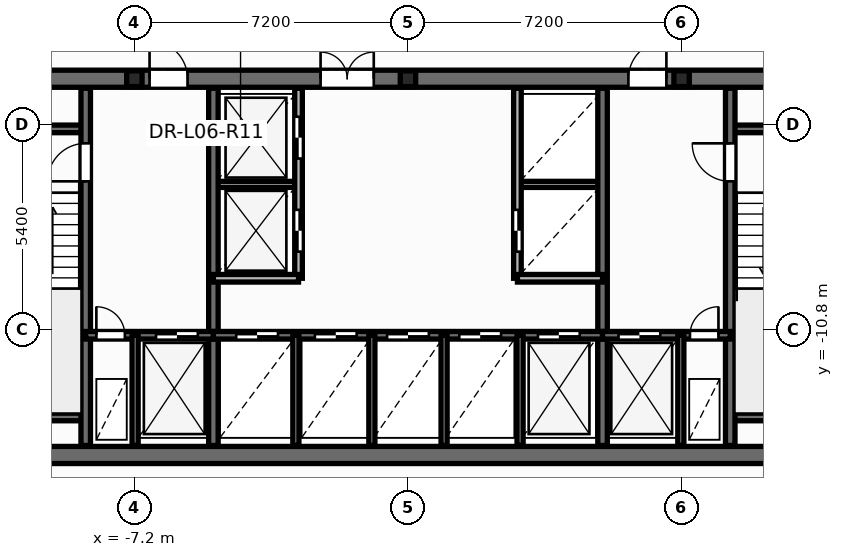
"""IFC4 building model, lengths in metres.
Left out: names, types, materials, properties, quantities, classifications, styles, units other than length and angle.
Written with IfcOpenShell. Run it as: python <this file> out.ifc"""

import sys

from ifc_helpers import new_model, si_unit, direction, frame, frame_2d, origin, origin_2d, place, context, subcontext, project, spatial, rectangle, i_section, extrude, element, fill, save


model = new_model("IFC4")
c1 = context("Model", 3, precision=1e-05, world=origin(), true_north=direction((0.0, 1.0)))
c2 = subcontext(c1, "Body", "Model", "MODEL_VIEW")
j1 = project(units=[si_unit("LENGTHUNIT", "METRE"), si_unit("PLANEANGLEUNIT", "RADIAN")], contexts=[c1])
p1 = place(None, origin())
s1 = spatial("IfcSite", under=j1, at=p1, CompositionType="ELEMENT")
p2 = place(p1, origin())
s2 = spatial("IfcBuilding", under=s1, at=p2, CompositionType="ELEMENT")
p3 = place(p2, frame((0.0, 0.0, 27.9)))
s3 = spatial("IfcBuildingStorey", under=s2, at=p3, CompositionType="ELEMENT", Elevation=27.9)
for number, where, z_axis, x_axis in (
    (1, (-7.2, -4.2, 0.0), (0.0, 0.0, 1.0), (1.0, 0.0, 0.0)),
    (2, (0.0, -4.2, 0.0), (0.0, 0.0, 1.0), (1.0, 0.0, 0.0)),
    (3, (7.2, -4.2, 0.0), (0.0, 0.0, 1.0), (1.0, 0.0, 0.0)),
):
    element("IfcColumn", number, at=place(p3, frame(where, z_axis=z_axis, x_axis=x_axis)), inside=s3, PredefinedType="PILASTER", context=c2, shape_type="SweptSolid", body=[
        extrude(i_section(OverallWidth=0.405, OverallDepth=0.414, WebThickness=0.022, FlangeThickness=0.032, at=origin_2d()), origin(), (0.0, 0.0, 1.0), 3.6),
    ])
for number, where, z_axis, x_axis in (
    (4, (-5.12, -6.98, 0.0), (0.0, 0.0, 1.0), (1.0, 0.0, 0.0)),
    (5, (2.88, -6.98, 0.0), (0.0, 0.0, 1.0), (1.0, 0.0, 0.0)),
):
    element("IfcWall", number, at=place(p3, frame(where, z_axis=z_axis, x_axis=x_axis)), inside=s3, PredefinedType="PARTITIONING", context=c2, shape_type="SweptSolid", body=[
        extrude(rectangle(XDim=2.24, YDim=0.16, at=frame_2d((1.12, 0.0))), origin(), (0.0, 0.0, 1.0), 3.35),
    ])
p4 = place(p3, frame((-12.65, -14.1, 0.0), z_axis=(0.0, 0.0, 1.0), x_axis=(1.0, 0.0, 0.0)))
e6 = element("IfcWall", 6, at=p4, inside=s3, PredefinedType="SHEAR", context=c2, shape_type="SweptSolid", body=[
    extrude(rectangle(XDim=25.3, YDim=0.45, at=frame_2d((12.65, 0.0))), origin(), (0.0, 0.0, 1.0), 3.6),
])
p5 = place(p3, frame((-12.65, -4.2, 0.0), z_axis=(0.0, 0.0, 1.0), x_axis=(1.0, 0.0, 0.0)))
e7 = element("IfcWall", 7, at=p5, inside=s3, PredefinedType="SHEAR", context=c2, shape_type="SweptSolid", body=[
    extrude(rectangle(XDim=25.3, YDim=0.45, at=frame_2d((12.65, 0.0))), origin(), (0.0, 0.0, 1.0), 3.6),
])
p6 = place(p5, frame((1.85, 0.0, 0.0)))
e8 = element("IfcOpeningElement", 8, at=p6, cuts=e7, PredefinedType="OPENING", context=c2, shape_type="SweptSolid", body=[
    extrude(rectangle(XDim=0.756, YDim=2.054, at=frame_2d((0.375, 1.027))), frame((0.0, 0.235, 0.0), z_axis=(0.0, -1.0, 0.0), x_axis=(1.0, 0.0, 0.0)), (0.0, 0.0, 1.0), 0.47),
])
p7 = place(p5, frame((22.65, 0.0, 0.0)))
e9 = element("IfcOpeningElement", 9, at=p7, cuts=e7, PredefinedType="OPENING", context=c2, shape_type="SweptSolid", body=[
    extrude(rectangle(XDim=0.756, YDim=2.054, at=frame_2d((0.375, 1.027))), frame((0.0, 0.235, 0.0), z_axis=(0.0, -1.0, 0.0), x_axis=(1.0, 0.0, 0.0)), (0.0, 0.0, 1.0), 0.47),
])
p8 = place(p5, frame((5.85, 0.0, 0.0)))
e10 = element("IfcOpeningElement", 10, at=p8, cuts=e7, PredefinedType="OPENING", context=c2, shape_type="SweptSolid", body=[
    extrude(rectangle(XDim=1.006, YDim=2.104, at=frame_2d((0.5, 1.052))), frame((0.0, 0.235, 0.0), z_axis=(0.0, -1.0, 0.0), x_axis=(1.0, 0.0, 0.0)), (0.0, 0.0, 1.0), 0.47),
])
p9 = place(p5, frame((10.35, 0.0, 0.0)))
e11 = element("IfcOpeningElement", 11, at=p9, cuts=e7, PredefinedType="OPENING", context=c2, shape_type="SweptSolid", body=[
    extrude(rectangle(XDim=1.406, YDim=2.154, at=frame_2d((0.7, 1.077))), frame((0.0, 0.235, 0.0), z_axis=(0.0, -1.0, 0.0), x_axis=(1.0, 0.0, 0.0)), (0.0, 0.0, 1.0), 0.47),
])
p10 = place(p5, frame((18.45, 0.0, 0.0)))
e12 = element("IfcOpeningElement", 12, at=p10, cuts=e7, PredefinedType="OPENING", context=c2, shape_type="SweptSolid", body=[
    extrude(rectangle(XDim=1.006, YDim=2.104, at=frame_2d((0.5, 1.052))), frame((0.0, 0.235, 0.0), z_axis=(0.0, -1.0, 0.0), x_axis=(1.0, 0.0, 0.0)), (0.0, 0.0, 1.0), 0.47),
])
for number, where, z_axis, x_axis in (
    (13, (-12.35, -5.52, 0.0), (0.0, 0.0, 1.0), (1.0, 0.0, 0.0)),
    (14, (-12.35, -13.1, 0.0), (0.0, 0.0, 1.0), (1.0, 0.0, 0.0)),
    (15, (8.48, -5.52, 0.0), (0.0, 0.0, 1.0), (1.0, 0.0, 0.0)),
    (16, (8.48, -13.1, 0.0), (0.0, 0.0, 1.0), (1.0, 0.0, 0.0)),
):
    element("IfcWall", number, at=place(p3, frame(where, z_axis=z_axis, x_axis=x_axis)), inside=s3, PredefinedType="SOLIDWALL", context=c2, shape_type="SweptSolid", body=[
        extrude(rectangle(XDim=3.87, YDim=0.2, at=frame_2d((1.935, 0.0))), origin(), (0.0, 0.0, 1.0), 3.6),
    ])
p11 = place(p3, frame((-8.48, -13.85, 0.0), z_axis=(0.0, 0.0, 1.0), x_axis=(0.0, 1.0, 0.0)))
e17 = element("IfcWall", 17, at=p11, inside=s3, PredefinedType="SHEAR", context=c2, shape_type="SweptSolid", body=[
    extrude(rectangle(XDim=9.4, YDim=0.25, at=frame_2d((4.7, 0.0))), origin(), (0.0, 0.0, 1.0), 3.6),
])
p12 = place(p11, frame((6.95, 0.0, 0.0)))
e18 = element("IfcOpeningElement", 18, at=p12, cuts=e17, PredefinedType="OPENING", context=c2, shape_type="SweptSolid", body=[
    extrude(rectangle(XDim=1.006, YDim=2.104, at=frame_2d((0.5, 1.052))), frame((0.0, 0.135, 0.0), z_axis=(0.0, -1.0, 0.0), x_axis=(1.0, 0.0, 0.0)), (0.0, 0.0, 1.0), 0.27),
])
p13 = place(p3, frame((8.48, -13.85, 0.0), z_axis=(0.0, 0.0, 1.0), x_axis=(0.0, 1.0, 0.0)))
e19 = element("IfcWall", 19, at=p13, inside=s3, PredefinedType="SHEAR", context=c2, shape_type="SweptSolid", body=[
    extrude(rectangle(XDim=9.4, YDim=0.25, at=frame_2d((4.7, 0.0))), origin(), (0.0, 0.0, 1.0), 3.6),
])
p14 = place(p13, frame((6.95, 0.0, 0.0)))
e20 = element("IfcOpeningElement", 20, at=p14, cuts=e19, PredefinedType="OPENING", context=c2, shape_type="SweptSolid", body=[
    extrude(rectangle(XDim=1.006, YDim=2.104, at=frame_2d((0.5, 1.052))), frame((0.0, 0.135, 0.0), z_axis=(0.0, -1.0, 0.0), x_axis=(1.0, 0.0, 0.0)), (0.0, 0.0, 1.0), 0.27),
])
for number, where, z_axis, x_axis in (
    (21, (-5.12, -13.85, 0.0), (0.0, 0.0, 1.0), (0.0, 1.0, 0.0)),
    (22, (5.12, -13.85, 0.0), (0.0, 0.0, 1.0), (0.0, 1.0, 0.0)),
):
    element("IfcWall", number, at=place(p3, frame(where, z_axis=z_axis, x_axis=x_axis)), inside=s3, PredefinedType="SHEAR", context=c2, shape_type="SweptSolid", body=[
        extrude(rectangle(XDim=9.4, YDim=0.25, at=frame_2d((4.7, 0.0))), origin(), (0.0, 0.0, 1.0), 3.6),
    ])
p15 = place(p3, frame((-8.48, -10.95, 0.0), z_axis=(0.0, 0.0, 1.0), x_axis=(1.0, 0.0, 0.0)))
e23 = element("IfcWall", 23, at=p15, inside=s3, PredefinedType="SOLIDWALL", context=c2, shape_type="SweptSolid", body=[
    extrude(rectangle(XDim=3.36, YDim=0.2, at=frame_2d((1.68, 0.0))), origin(), (0.0, 0.0, 1.0), 3.6),
])
p16 = place(p15, frame((0.28, 0.0, 0.0)))
e24 = element("IfcOpeningElement", 24, at=p16, cuts=e23, PredefinedType="OPENING", context=c2, shape_type="SweptSolid", body=[
    extrude(rectangle(XDim=0.756, YDim=2.054, at=frame_2d((0.375, 1.027))), frame((0.0, 0.11, 0.0), z_axis=(0.0, -1.0, 0.0), x_axis=(1.0, 0.0, 0.0)), (0.0, 0.0, 1.0), 0.22),
])
p17 = place(p15, frame((1.85, 0.0, 0.0)))
e25 = element("IfcOpeningElement", 25, at=p17, cuts=e23, PredefinedType="OPENING", context=c2, shape_type="SweptSolid", body=[
    extrude(rectangle(XDim=1.106, YDim=2.104, at=frame_2d((0.55, 1.052))), frame((0.0, 0.11, 0.0), z_axis=(0.0, -1.0, 0.0), x_axis=(1.0, 0.0, 0.0)), (0.0, 0.0, 1.0), 0.22),
])
p18 = place(p3, frame((-5.12, -10.95, 0.0), z_axis=(0.0, 0.0, 1.0), x_axis=(1.0, 0.0, 0.0)))
e26 = element("IfcWall", 26, at=p18, inside=s3, PredefinedType="SOLIDWALL", context=c2, shape_type="SweptSolid", body=[
    extrude(rectangle(XDim=10.24, YDim=0.2, at=frame_2d((5.12, 0.0))), origin(), (0.0, 0.0, 1.0), 3.6),
])
p19 = place(p18, frame((0.6, 0.0, 0.0)))
e27 = element("IfcOpeningElement", 27, at=p19, cuts=e26, PredefinedType="OPENING", context=c2, shape_type="SweptSolid", body=[
    extrude(rectangle(XDim=1.106, YDim=2.104, at=frame_2d((0.55, 1.052))), frame((0.0, 0.11, 0.0), z_axis=(0.0, -1.0, 0.0), x_axis=(1.0, 0.0, 0.0)), (0.0, 0.0, 1.0), 0.22),
])
p20 = place(p18, frame((2.67, 0.0, 0.0)))
e28 = element("IfcOpeningElement", 28, at=p20, cuts=e26, PredefinedType="OPENING", context=c2, shape_type="SweptSolid", body=[
    extrude(rectangle(XDim=1.106, YDim=2.104, at=frame_2d((0.55, 1.052))), frame((0.0, 0.11, 0.0), z_axis=(0.0, -1.0, 0.0), x_axis=(1.0, 0.0, 0.0)), (0.0, 0.0, 1.0), 0.22),
])
p21 = place(p18, frame((4.57, 0.0, 0.0)))
e29 = element("IfcOpeningElement", 29, at=p21, cuts=e26, PredefinedType="OPENING", context=c2, shape_type="SweptSolid", body=[
    extrude(rectangle(XDim=1.106, YDim=2.104, at=frame_2d((0.55, 1.052))), frame((0.0, 0.11, 0.0), z_axis=(0.0, -1.0, 0.0), x_axis=(1.0, 0.0, 0.0)), (0.0, 0.0, 1.0), 0.22),
])
p22 = place(p18, frame((6.47, 0.0, 0.0)))
e30 = element("IfcOpeningElement", 30, at=p22, cuts=e26, PredefinedType="OPENING", context=c2, shape_type="SweptSolid", body=[
    extrude(rectangle(XDim=1.106, YDim=2.104, at=frame_2d((0.55, 1.052))), frame((0.0, 0.11, 0.0), z_axis=(0.0, -1.0, 0.0), x_axis=(1.0, 0.0, 0.0)), (0.0, 0.0, 1.0), 0.22),
])
p23 = place(p18, frame((8.54, 0.0, 0.0)))
e31 = element("IfcOpeningElement", 31, at=p23, cuts=e26, PredefinedType="OPENING", context=c2, shape_type="SweptSolid", body=[
    extrude(rectangle(XDim=1.106, YDim=2.104, at=frame_2d((0.55, 1.052))), frame((0.0, 0.11, 0.0), z_axis=(0.0, -1.0, 0.0), x_axis=(1.0, 0.0, 0.0)), (0.0, 0.0, 1.0), 0.22),
])
p24 = place(p3, frame((5.12, -10.95, 0.0), z_axis=(0.0, 0.0, 1.0), x_axis=(1.0, 0.0, 0.0)))
e32 = element("IfcWall", 32, at=p24, inside=s3, PredefinedType="SOLIDWALL", context=c2, shape_type="SweptSolid", body=[
    extrude(rectangle(XDim=3.36, YDim=0.2, at=frame_2d((1.68, 0.0))), origin(), (0.0, 0.0, 1.0), 3.6),
])
p25 = place(p24, frame((0.42, 0.0, 0.0)))
e33 = element("IfcOpeningElement", 33, at=p25, cuts=e32, PredefinedType="OPENING", context=c2, shape_type="SweptSolid", body=[
    extrude(rectangle(XDim=1.106, YDim=2.104, at=frame_2d((0.55, 1.052))), frame((0.0, 0.11, 0.0), z_axis=(0.0, -1.0, 0.0), x_axis=(1.0, 0.0, 0.0)), (0.0, 0.0, 1.0), 0.22),
])
p26 = place(p24, frame((2.3, 0.0, 0.0)))
e34 = element("IfcOpeningElement", 34, at=p26, cuts=e32, PredefinedType="OPENING", context=c2, shape_type="SweptSolid", body=[
    extrude(rectangle(XDim=0.756, YDim=2.054, at=frame_2d((0.375, 1.027))), frame((0.0, 0.11, 0.0), z_axis=(0.0, -1.0, 0.0), x_axis=(1.0, 0.0, 0.0)), (0.0, 0.0, 1.0), 0.22),
])
for number, where, z_axis, x_axis in (
    (35, (-7.18, -13.85, 0.0), (0.0, 0.0, 1.0), (0.0, 1.0, 0.0)),
    (36, (7.18, -13.85, 0.0), (0.0, 0.0, 1.0), (0.0, 1.0, 0.0)),
    (37, (-2.95, -13.85, 0.0), (0.0, 0.0, 1.0), (0.0, 1.0, 0.0)),
    (38, (2.95, -13.85, 0.0), (0.0, 0.0, 1.0), (0.0, 1.0, 0.0)),
):
    element("IfcWall", number, at=place(p3, frame(where, z_axis=z_axis, x_axis=x_axis)), inside=s3, PredefinedType="PARTITIONING", context=c2, shape_type="SweptSolid", body=[
        extrude(rectangle(XDim=2.9, YDim=0.16, at=frame_2d((1.45, 0.0))), origin(), (0.0, 0.0, 1.0), 2.375),
    ])
p27 = place(p3, frame((-2.88, -9.45, 0.0), z_axis=(0.0, 0.0, 1.0), x_axis=(0.0, 1.0, 0.0)))
e39 = element("IfcWall", 39, at=p27, inside=s3, PredefinedType="SOLIDWALL", context=c2, shape_type="SweptSolid", body=[
    extrude(rectangle(XDim=5.0, YDim=0.2, at=frame_2d((2.5, 0.0))), origin(), (0.0, 0.0, 1.0), 3.35),
])
p28 = place(p27, frame((0.7, 0.0, 0.0)))
e40 = element("IfcOpeningElement", 40, at=p28, cuts=e39, PredefinedType="OPENING", context=c2, shape_type="SweptSolid", body=[
    extrude(rectangle(XDim=1.106, YDim=2.104, at=frame_2d((0.55, 1.052))), frame((0.0, 0.11, 0.0), z_axis=(0.0, -1.0, 0.0), x_axis=(1.0, 0.0, 0.0)), (0.0, 0.0, 1.0), 0.22),
])
p29 = place(p27, frame((3.15, 0.0, 0.0)))
e41 = element("IfcOpeningElement", 41, at=p29, cuts=e39, PredefinedType="OPENING", context=c2, shape_type="SweptSolid", body=[
    extrude(rectangle(XDim=1.106, YDim=2.104, at=frame_2d((0.55, 1.052))), frame((0.0, 0.11, 0.0), z_axis=(0.0, -1.0, 0.0), x_axis=(1.0, 0.0, 0.0)), (0.0, 0.0, 1.0), 0.22),
])
p30 = place(p3, frame((-5.12, -9.45, 0.0), z_axis=(0.0, 0.0, 1.0), x_axis=(1.0, 0.0, 0.0)))
e42 = element("IfcWall", 42, at=p30, inside=s3, PredefinedType="SOLIDWALL", context=c2, shape_type="SweptSolid", body=[
    extrude(rectangle(XDim=2.24, YDim=0.2, at=frame_2d((1.12, 0.0))), origin(), (0.0, 0.0, 1.0), 3.35),
])
p31 = place(p3, frame((2.88, -9.45, 0.0), z_axis=(0.0, 0.0, 1.0), x_axis=(0.0, 1.0, 0.0)))
e43 = element("IfcWall", 43, at=p31, inside=s3, PredefinedType="SOLIDWALL", context=c2, shape_type="SweptSolid", body=[
    extrude(rectangle(XDim=5.0, YDim=0.2, at=frame_2d((2.5, 0.0))), origin(), (0.0, 0.0, 1.0), 3.35),
])
p32 = place(p31, frame((0.7, 0.0, 0.0)))
e44 = element("IfcOpeningElement", 44, at=p32, cuts=e43, PredefinedType="OPENING", context=c2, shape_type="SweptSolid", body=[
    extrude(rectangle(XDim=1.106, YDim=2.104, at=frame_2d((0.55, 1.052))), frame((0.0, 0.11, 0.0), z_axis=(0.0, -1.0, 0.0), x_axis=(1.0, 0.0, 0.0)), (0.0, 0.0, 1.0), 0.22),
])
p33 = place(p3, frame((2.88, -9.45, 0.0), z_axis=(0.0, 0.0, 1.0), x_axis=(1.0, 0.0, 0.0)))
e45 = element("IfcWall", 45, at=p33, inside=s3, PredefinedType="SOLIDWALL", context=c2, shape_type="SweptSolid", body=[
    extrude(rectangle(XDim=2.24, YDim=0.2, at=frame_2d((1.12, 0.0))), origin(), (0.0, 0.0, 1.0), 3.35),
])
for number, where, z_axis, x_axis in (
    (46, (-0.95, -13.85, 0.0), (0.0, 0.0, 1.0), (0.0, 1.0, 0.0)),
    (47, (0.95, -13.85, 0.0), (0.0, 0.0, 1.0), (0.0, 1.0, 0.0)),
):
    element("IfcWall", number, at=place(p3, frame(where, z_axis=z_axis, x_axis=x_axis)), inside=s3, PredefinedType="PARTITIONING", context=c2, shape_type="SweptSolid", body=[
        extrude(rectangle(XDim=2.9, YDim=0.16, at=frame_2d((1.45, 0.0))), origin(), (0.0, 0.0, 1.0), 2.375),
    ])
p34 = place(p28, origin())
e48 = element("IfcDoor", 48, at=p34, inside=s3, OperationType="DOUBLE_DOOR_SLIDING", PredefinedType="DOOR", context=c2, shape_type="SweptSolid", body=[
    extrude(rectangle(XDim=1.1, YDim=2.1, at=frame_2d((0.55, 1.05))), frame((0.0, 0.025, 0.0), z_axis=(0.0, -1.0, 0.0), x_axis=(1.0, 0.0, 0.0)), (0.0, 0.0, 1.0), 0.05),
])
fill(e40, e48)
p35 = place(p29, origin())
e49 = element("IfcDoor", 49, at=p35, inside=s3, OperationType="DOUBLE_DOOR_SLIDING", PredefinedType="DOOR", context=c2, shape_type="SweptSolid", body=[
    extrude(rectangle(XDim=1.1, YDim=2.1, at=frame_2d((0.55, 1.05))), frame((0.0, 0.025, 0.0), z_axis=(0.0, -1.0, 0.0), x_axis=(1.0, 0.0, 0.0)), (0.0, 0.0, 1.0), 0.05),
])
fill(e41, e49)
p36 = place(p32, origin())
e50 = element("IfcDoor", 50, at=p36, inside=s3, OperationType="DOUBLE_DOOR_SLIDING", PredefinedType="DOOR", context=c2, shape_type="SweptSolid", body=[
    extrude(rectangle(XDim=1.1, YDim=2.1, at=frame_2d((0.55, 1.05))), frame((0.0, 0.025, 0.0), z_axis=(0.0, -1.0, 0.0), x_axis=(1.0, 0.0, 0.0)), (0.0, 0.0, 1.0), 0.05),
])
fill(e44, e50)
p37 = place(p12, origin())
e51 = element("IfcDoor", 51, at=p37, inside=s3, OperationType="SINGLE_SWING_LEFT", PredefinedType="DOOR", context=c2, shape_type="SweptSolid", body=[
    extrude(rectangle(XDim=1.0, YDim=2.1, at=frame_2d((0.5, 1.05))), frame((0.0, 0.025, 0.0), z_axis=(0.0, -1.0, 0.0), x_axis=(1.0, 0.0, 0.0)), (0.0, 0.0, 1.0), 0.05),
])
fill(e18, e51)
p38 = place(p14, origin())
e52 = element("IfcDoor", 52, at=p38, inside=s3, OperationType="SINGLE_SWING_RIGHT", PredefinedType="DOOR", context=c2, shape_type="SweptSolid", body=[
    extrude(rectangle(XDim=1.0, YDim=2.1, at=frame_2d((0.5, 1.05))), frame((0.0, 0.025, 0.0), z_axis=(0.0, -1.0, 0.0), x_axis=(1.0, 0.0, 0.0)), (0.0, 0.0, 1.0), 0.05),
])
fill(e20, e52)
p39 = place(p16, origin())
e53 = element("IfcDoor", 53, at=p39, inside=s3, OperationType="SINGLE_SWING_LEFT", PredefinedType="DOOR", context=c2, shape_type="SweptSolid", body=[
    extrude(rectangle(XDim=0.75, YDim=2.05, at=frame_2d((0.375, 1.025))), frame((0.0, 0.025, 0.0), z_axis=(0.0, -1.0, 0.0), x_axis=(1.0, 0.0, 0.0)), (0.0, 0.0, 1.0), 0.05),
])
fill(e24, e53)
p40 = place(p17, origin())
e54 = element("IfcDoor", 54, at=p40, inside=s3, OperationType="DOUBLE_DOOR_SLIDING", PredefinedType="DOOR", context=c2, shape_type="SweptSolid", body=[
    extrude(rectangle(XDim=1.1, YDim=2.1, at=frame_2d((0.55, 1.05))), frame((0.0, 0.025, 0.0), z_axis=(0.0, -1.0, 0.0), x_axis=(1.0, 0.0, 0.0)), (0.0, 0.0, 1.0), 0.05),
])
fill(e25, e54)
p41 = place(p25, origin())
e55 = element("IfcDoor", 55, at=p41, inside=s3, OperationType="DOUBLE_DOOR_SLIDING", PredefinedType="DOOR", context=c2, shape_type="SweptSolid", body=[
    extrude(rectangle(XDim=1.1, YDim=2.1, at=frame_2d((0.55, 1.05))), frame((0.0, 0.025, 0.0), z_axis=(0.0, -1.0, 0.0), x_axis=(1.0, 0.0, 0.0)), (0.0, 0.0, 1.0), 0.05),
])
fill(e33, e55)
p42 = place(p26, origin())
e56 = element("IfcDoor", 56, at=p42, inside=s3, OperationType="SINGLE_SWING_RIGHT", PredefinedType="DOOR", context=c2, shape_type="SweptSolid", body=[
    extrude(rectangle(XDim=0.75, YDim=2.05, at=frame_2d((0.375, 1.025))), frame((0.0, 0.025, 0.0), z_axis=(0.0, -1.0, 0.0), x_axis=(1.0, 0.0, 0.0)), (0.0, 0.0, 1.0), 0.05),
])
fill(e34, e56)
p43 = place(p19, origin())
e57 = element("IfcDoor", 57, at=p43, inside=s3, OperationType="DOUBLE_DOOR_SLIDING", PredefinedType="DOOR", context=c2, shape_type="SweptSolid", body=[
    extrude(rectangle(XDim=1.1, YDim=2.1, at=frame_2d((0.55, 1.05))), frame((0.0, 0.025, 0.0), z_axis=(0.0, -1.0, 0.0), x_axis=(1.0, 0.0, 0.0)), (0.0, 0.0, 1.0), 0.05),
])
fill(e27, e57)
p44 = place(p20, origin())
e58 = element("IfcDoor", 58, at=p44, inside=s3, OperationType="DOUBLE_DOOR_SLIDING", PredefinedType="DOOR", context=c2, shape_type="SweptSolid", body=[
    extrude(rectangle(XDim=1.1, YDim=2.1, at=frame_2d((0.55, 1.05))), frame((0.0, 0.025, 0.0), z_axis=(0.0, -1.0, 0.0), x_axis=(1.0, 0.0, 0.0)), (0.0, 0.0, 1.0), 0.05),
])
fill(e28, e58)
p45 = place(p21, origin())
e59 = element("IfcDoor", 59, at=p45, inside=s3, OperationType="DOUBLE_DOOR_SLIDING", PredefinedType="DOOR", context=c2, shape_type="SweptSolid", body=[
    extrude(rectangle(XDim=1.1, YDim=2.1, at=frame_2d((0.55, 1.05))), frame((0.0, 0.025, 0.0), z_axis=(0.0, -1.0, 0.0), x_axis=(1.0, 0.0, 0.0)), (0.0, 0.0, 1.0), 0.05),
])
fill(e29, e59)
p46 = place(p22, origin())
e60 = element("IfcDoor", 60, at=p46, inside=s3, OperationType="DOUBLE_DOOR_SLIDING", PredefinedType="DOOR", context=c2, shape_type="SweptSolid", body=[
    extrude(rectangle(XDim=1.1, YDim=2.1, at=frame_2d((0.55, 1.05))), frame((0.0, 0.025, 0.0), z_axis=(0.0, -1.0, 0.0), x_axis=(1.0, 0.0, 0.0)), (0.0, 0.0, 1.0), 0.05),
])
fill(e30, e60)
p47 = place(p23, origin())
e61 = element("IfcDoor", 61, at=p47, inside=s3, OperationType="DOUBLE_DOOR_SLIDING", PredefinedType="DOOR", context=c2, shape_type="SweptSolid", body=[
    extrude(rectangle(XDim=1.1, YDim=2.1, at=frame_2d((0.55, 1.05))), frame((0.0, 0.025, 0.0), z_axis=(0.0, -1.0, 0.0), x_axis=(1.0, 0.0, 0.0)), (0.0, 0.0, 1.0), 0.05),
])
fill(e31, e61)
p48 = place(p8, origin())
e62 = element("IfcDoor", 62, at=p48, inside=s3, OperationType="SINGLE_SWING_LEFT", PredefinedType="DOOR", context=c2, shape_type="SweptSolid", body=[
    extrude(rectangle(XDim=1.0, YDim=2.1, at=frame_2d((0.5, 1.05))), frame((0.0, 0.025, 0.0), z_axis=(0.0, -1.0, 0.0), x_axis=(1.0, 0.0, 0.0)), (0.0, 0.0, 1.0), 0.05),
])
fill(e10, e62)
p49 = place(p9, origin())
e63 = element("IfcDoor", 63, at=p49, inside=s3, OperationType="DOUBLE_DOOR_SINGLE_SWING", PredefinedType="DOOR", context=c2, shape_type="SweptSolid", body=[
    extrude(rectangle(XDim=1.4, YDim=2.15, at=frame_2d((0.7, 1.075))), frame((0.0, 0.025, 0.0), z_axis=(0.0, -1.0, 0.0), x_axis=(1.0, 0.0, 0.0)), (0.0, 0.0, 1.0), 0.05),
])
fill(e11, e63)
p50 = place(p10, origin())
e64 = element("IfcDoor", 64, at=p50, inside=s3, OperationType="SINGLE_SWING_RIGHT", PredefinedType="DOOR", context=c2, shape_type="SweptSolid", body=[
    extrude(rectangle(XDim=1.0, YDim=2.1, at=frame_2d((0.5, 1.05))), frame((0.0, 0.025, 0.0), z_axis=(0.0, -1.0, 0.0), x_axis=(1.0, 0.0, 0.0)), (0.0, 0.0, 1.0), 0.05),
])
fill(e12, e64)
save(model, sys.argv[1])
